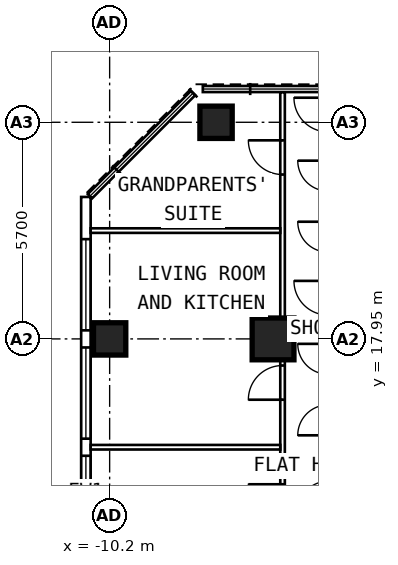
"""IFC4 building model, lengths in metres.
Left out: names, types, materials, properties, quantities, classifications, styles, units other than length and angle.
Written with IfcOpenShell. Run it as: python <this file> out.ifc"""

import sys

from ifc_helpers import new_model, si_unit, direction, frame, frame_2d, origin, origin_2d, place, context, subcontext, project, spatial, rectangle, extrude, element, fill, save


model = new_model("IFC4")
c1 = context("Model", 3, precision=1e-05, world=origin(), true_north=direction((0.0, 1.0)))
c2 = subcontext(c1, "Body", "Model", "MODEL_VIEW")
j1 = project(units=[si_unit("LENGTHUNIT", "METRE"), si_unit("PLANEANGLEUNIT", "RADIAN")], contexts=[c1])
p1 = place(None, origin())
s1 = spatial("IfcSite", under=j1, at=p1, CompositionType="ELEMENT")
p2 = place(p1, origin())
s2 = spatial("IfcBuilding", under=s1, at=p2, CompositionType="ELEMENT")
p3 = place(p2, frame((0.0, 0.0, 231.6)))
s3 = spatial("IfcBuildingStorey", under=s2, at=p3, CompositionType="ELEMENT", Elevation=231.6)
for number, where, z_axis, x_axis in (
    (1, (-10.2, 17.95, 0.0), (0.0, 0.0, 1.0), (0.0, 1.0, 0.0)),
    (2, (-7.4, 23.65, 0.0), (0.0, 0.0, 1.0), (0.0, 1.0, 0.0)),
):
    element("IfcColumn", number, at=place(p3, frame(where, z_axis=z_axis, x_axis=x_axis)), inside=s3, PredefinedType="COLUMN", context=c2, shape_type="SweptSolid", body=[
        extrude(rectangle(XDim=0.85, YDim=0.85, at=origin_2d()), origin(), (0.0, 0.0, 1.0), 3.6),
    ])
p4 = place(p3, frame((-5.9, 17.95, 0.0), z_axis=(0.0, 0.0, 1.0), x_axis=(0.0, 1.0, 0.0)))
e3 = element("IfcColumn", 3, at=p4, inside=s3, PredefinedType="COLUMN", context=c2, shape_type="SweptSolid", body=[
    extrude(rectangle(XDim=1.1, YDim=1.1, at=origin_2d()), origin(), (0.0, 0.0, 1.0), 3.6),
])
p5 = place(p3, frame((-10.825, 6.148, 0.0), z_axis=(0.0, 0.0, 1.0), x_axis=(0.0, 1.0, 0.0)))
e4 = element("IfcWall", 4, at=p5, inside=s3, PredefinedType="SOLIDWALL", context=c2, shape_type="SweptSolid", body=[
    extrude(rectangle(XDim=15.537, YDim=0.25, at=frame_2d((7.769, 0.0))), origin(), (0.0, 0.0, 1.0), 3.35),
])
p6 = place(p5, frame((0.627, 0.0, 0.8)))
e5 = element("IfcOpeningElement", 5, at=p6, cuts=e4, PredefinedType="OPENING", context=c2, shape_type="SweptSolid", body=[
    extrude(rectangle(XDim=2.4, YDim=1.8, at=frame_2d((1.2, 0.9))), frame((0.0, 0.137, 0.0), z_axis=(0.0, -1.0, 0.0), x_axis=(1.0, 0.0, 0.0)), (0.0, 0.0, 1.0), 0.274),
])
p7 = place(p5, frame((3.477, 0.0, 0.8)))
e6 = element("IfcOpeningElement", 6, at=p7, cuts=e4, PredefinedType="OPENING", context=c2, shape_type="SweptSolid", body=[
    extrude(rectangle(XDim=2.4, YDim=1.8, at=frame_2d((1.2, 0.9))), frame((0.0, 0.137, 0.0), z_axis=(0.0, -1.0, 0.0), x_axis=(1.0, 0.0, 0.0)), (0.0, 0.0, 1.0), 0.274),
])
p8 = place(p5, frame((6.327, 0.0, 0.8)))
e7 = element("IfcOpeningElement", 7, at=p8, cuts=e4, PredefinedType="OPENING", context=c2, shape_type="SweptSolid", body=[
    extrude(rectangle(XDim=2.4, YDim=1.8, at=frame_2d((1.2, 0.9))), frame((0.0, 0.137, 0.0), z_axis=(0.0, -1.0, 0.0), x_axis=(1.0, 0.0, 0.0)), (0.0, 0.0, 1.0), 0.274),
])
p9 = place(p5, frame((9.177, 0.0, 0.8)))
e8 = element("IfcOpeningElement", 8, at=p9, cuts=e4, PredefinedType="OPENING", context=c2, shape_type="SweptSolid", body=[
    extrude(rectangle(XDim=2.4, YDim=1.8, at=frame_2d((1.2, 0.9))), frame((0.0, 0.137, 0.0), z_axis=(0.0, -1.0, 0.0), x_axis=(1.0, 0.0, 0.0)), (0.0, 0.0, 1.0), 0.274),
])
p10 = place(p5, frame((12.027, 0.0, 0.8)))
e9 = element("IfcOpeningElement", 9, at=p10, cuts=e4, PredefinedType="OPENING", context=c2, shape_type="SweptSolid", body=[
    extrude(rectangle(XDim=2.4, YDim=1.8, at=frame_2d((1.2, 0.9))), frame((0.0, 0.137, 0.0), z_axis=(0.0, -1.0, 0.0), x_axis=(1.0, 0.0, 0.0)), (0.0, 0.0, 1.0), 0.274),
])
p11 = place(p3, frame((-5.65, 9.6, 0.0), z_axis=(0.0, 0.0, 1.0), x_axis=(0.0, 1.0, 0.0)))
e10 = element("IfcWall", 10, at=p11, inside=s3, PredefinedType="PARTITIONING", context=c2, shape_type="SweptSolid", body=[
    extrude(rectangle(XDim=14.845, YDim=0.12, at=frame_2d((7.422, 0.0))), origin(), (0.0, 0.0, 1.0), 3.35),
])
p12 = place(p11, frame((1.05, 0.0, 0.0)))
e11 = element("IfcOpeningElement", 11, at=p12, cuts=e10, PredefinedType="OPENING", context=c2, shape_type="SweptSolid", body=[
    extrude(rectangle(XDim=0.9, YDim=2.1, at=frame_2d((0.45, 1.05))), frame((0.0, 0.072, 0.0), z_axis=(0.0, -1.0, 0.0), x_axis=(1.0, 0.0, 0.0)), (0.0, 0.0, 1.0), 0.144),
])
p13 = place(p11, frame((3.625, 0.0, 0.0)))
e12 = element("IfcOpeningElement", 12, at=p13, cuts=e10, PredefinedType="OPENING", context=c2, shape_type="SweptSolid", body=[
    extrude(rectangle(XDim=0.9, YDim=2.1, at=frame_2d((0.45, 1.05))), frame((0.0, 0.072, 0.0), z_axis=(0.0, -1.0, 0.0), x_axis=(1.0, 0.0, 0.0)), (0.0, 0.0, 1.0), 0.144),
])
p14 = place(p11, frame((6.75, 0.0, 0.0)))
e13 = element("IfcOpeningElement", 13, at=p14, cuts=e10, PredefinedType="OPENING", context=c2, shape_type="SweptSolid", body=[
    extrude(rectangle(XDim=0.9, YDim=2.1, at=frame_2d((0.45, 1.05))), frame((0.0, 0.072, 0.0), z_axis=(0.0, -1.0, 0.0), x_axis=(1.0, 0.0, 0.0)), (0.0, 0.0, 1.0), 0.144),
])
p15 = place(p11, frame((12.675, 0.0, 0.0)))
e14 = element("IfcOpeningElement", 14, at=p15, cuts=e10, PredefinedType="OPENING", context=c2, shape_type="SweptSolid", body=[
    extrude(rectangle(XDim=0.9, YDim=2.1, at=frame_2d((0.45, 1.05))), frame((0.0, 0.072, 0.0), z_axis=(0.0, -1.0, 0.0), x_axis=(1.0, 0.0, 0.0)), (0.0, 0.0, 1.0), 0.144),
])
for number, where, z_axis, x_axis in (
    (15, (-5.71, 15.1, 0.0), (0.0, 0.0, 1.0), (-1.0, 0.0, 0.0)),
    (16, (-5.71, 20.8, 0.0), (0.0, 0.0, 1.0), (-1.0, 0.0, 0.0)),
):
    element("IfcWall", number, at=place(p3, frame(where, z_axis=z_axis, x_axis=x_axis)), inside=s3, PredefinedType="PARTITIONING", context=c2, shape_type="SweptSolid", body=[
        extrude(rectangle(XDim=4.99, YDim=0.12, at=frame_2d((2.495, 0.0))), origin(), (0.0, 0.0, 1.0), 3.35),
    ])
p16 = place(p8, origin())
e17 = element("IfcWindow", 17, at=p16, inside=s3, PartitioningType="SINGLE_PANEL", PredefinedType="WINDOW", context=c2, shape_type="SweptSolid", body=[
    extrude(rectangle(XDim=2.4, YDim=1.8, at=frame_2d((1.2, 0.9))), frame((0.0, 0.03, 0.0), z_axis=(0.0, -1.0, 0.0), x_axis=(1.0, 0.0, 0.0)), (0.0, 0.0, 1.0), 0.06),
])
fill(e7, e17)
p17 = place(p9, origin())
e18 = element("IfcWindow", 18, at=p17, inside=s3, PartitioningType="SINGLE_PANEL", PredefinedType="WINDOW", context=c2, shape_type="SweptSolid", body=[
    extrude(rectangle(XDim=2.4, YDim=1.8, at=frame_2d((1.2, 0.9))), frame((0.0, 0.03, 0.0), z_axis=(0.0, -1.0, 0.0), x_axis=(1.0, 0.0, 0.0)), (0.0, 0.0, 1.0), 0.06),
])
fill(e8, e18)
p18 = place(p10, origin())
e19 = element("IfcWindow", 19, at=p18, inside=s3, PartitioningType="SINGLE_PANEL", PredefinedType="WINDOW", context=c2, shape_type="SweptSolid", body=[
    extrude(rectangle(XDim=2.4, YDim=1.8, at=frame_2d((1.2, 0.9))), frame((0.0, 0.03, 0.0), z_axis=(0.0, -1.0, 0.0), x_axis=(1.0, 0.0, 0.0)), (0.0, 0.0, 1.0), 0.06),
])
fill(e9, e19)
p19 = place(p13, origin())
e20 = element("IfcDoor", 20, at=p19, inside=s3, OperationType="SINGLE_SWING_RIGHT", PredefinedType="DOOR", context=c2, shape_type="SweptSolid", body=[
    extrude(rectangle(XDim=0.9, YDim=2.1, at=frame_2d((0.45, 1.05))), frame((0.0, 0.025, 0.0), z_axis=(0.0, -1.0, 0.0), x_axis=(1.0, 0.0, 0.0)), (0.0, 0.0, 1.0), 0.05),
])
fill(e12, e20)
p20 = place(p14, origin())
e21 = element("IfcDoor", 21, at=p20, inside=s3, OperationType="SINGLE_SWING_LEFT", PredefinedType="DOOR", context=c2, shape_type="SweptSolid", body=[
    extrude(rectangle(XDim=0.9, YDim=2.1, at=frame_2d((0.45, 1.05))), frame((0.0, 0.025, 0.0), z_axis=(0.0, -1.0, 0.0), x_axis=(1.0, 0.0, 0.0)), (0.0, 0.0, 1.0), 0.05),
])
fill(e13, e21)
p21 = place(p15, origin())
e22 = element("IfcDoor", 22, at=p21, inside=s3, OperationType="SINGLE_SWING_RIGHT", PredefinedType="DOOR", context=c2, shape_type="SweptSolid", body=[
    extrude(rectangle(XDim=0.9, YDim=2.1, at=frame_2d((0.45, 1.05))), frame((0.0, 0.025, 0.0), z_axis=(0.0, -1.0, 0.0), x_axis=(1.0, 0.0, 0.0)), (0.0, 0.0, 1.0), 0.05),
])
fill(e14, e22)
save(model, sys.argv[1])
